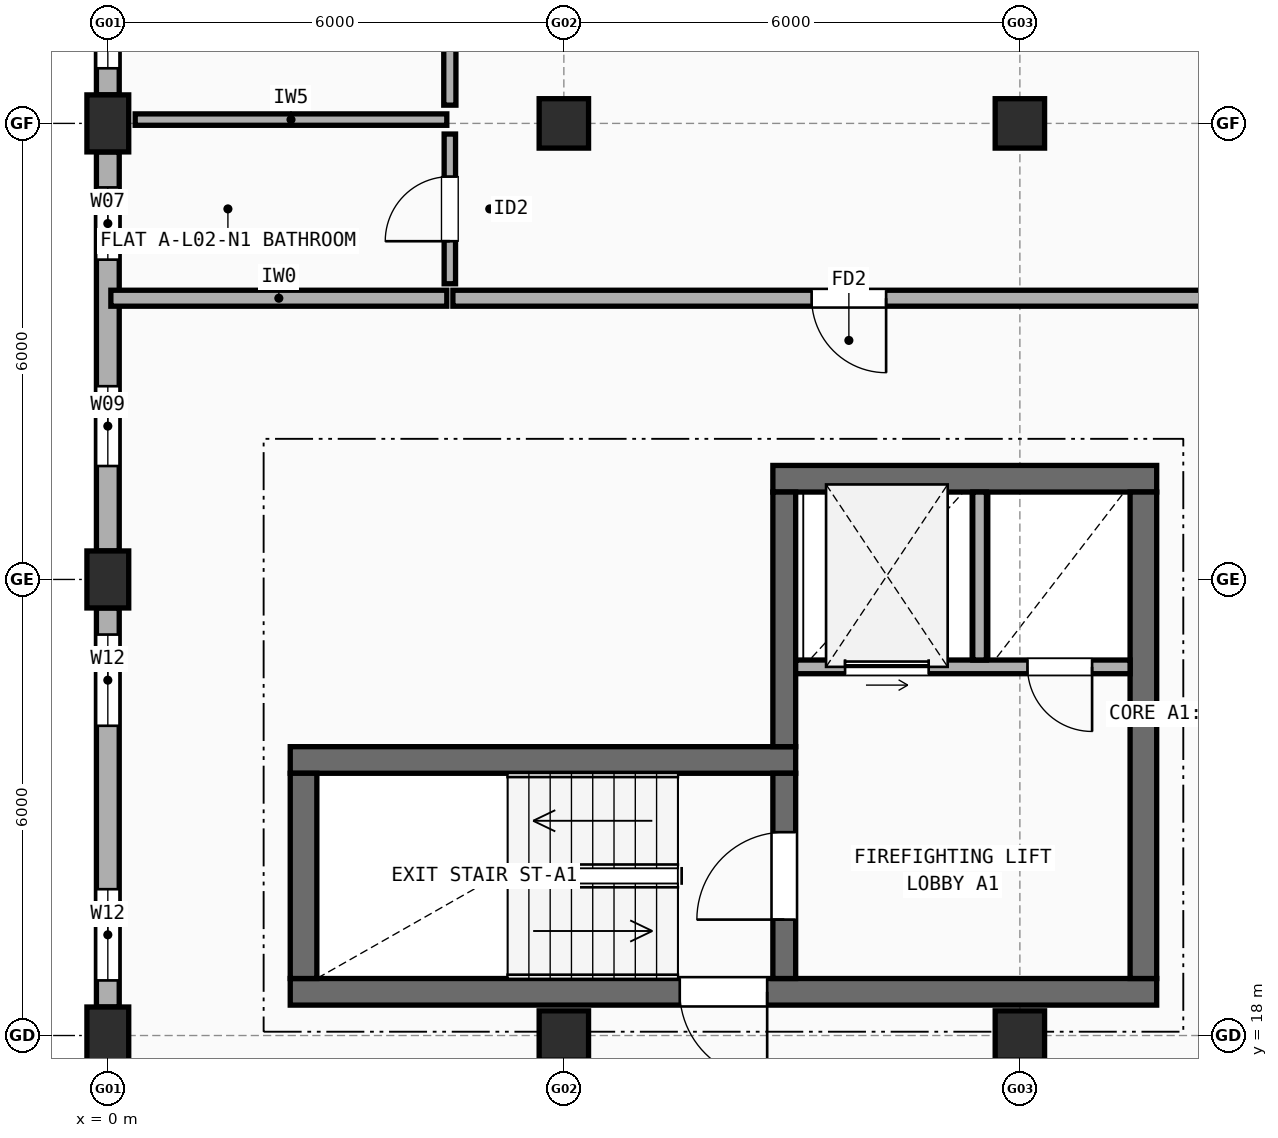
"""IFC4 building model, lengths in metres.
Left out: names, types, materials, properties, quantities, classifications, styles, units other than length and angle.
Written with IfcOpenShell. Run it as: python <this file> out.ifc"""

import sys

from ifc_helpers import new_model, si_unit, direction, frame, frame_2d, origin, origin_2d, place, context, subcontext, project, spatial, rectangle, extrude, element, fill, save


model = new_model("IFC4")
c1 = context("Model", 3, precision=1e-05, world=origin(), true_north=direction((0.0, 1.0)))
c2 = subcontext(c1, "Body", "Model", "MODEL_VIEW")
j1 = project(units=[si_unit("LENGTHUNIT", "METRE"), si_unit("PLANEANGLEUNIT", "RADIAN")], contexts=[c1])
p1 = place(None, origin())
s1 = spatial("IfcSite", under=j1, at=p1, CompositionType="ELEMENT")
p2 = place(p1, origin())
s2 = spatial("IfcBuilding", under=s1, at=p2, CompositionType="ELEMENT")
p3 = place(p2, frame((0.0, 0.0, 7.7)))
s3 = spatial("IfcBuildingStorey", under=s2, at=p3, CompositionType="ELEMENT", Elevation=7.7)
for number, where, z_axis, x_axis in (
    (1, (0.0, 18.0, 0.0), (0.0, 0.0, 1.0), (1.0, 0.0, 0.0)),
    (2, (0.0, 24.0, 0.0), (0.0, 0.0, 1.0), (1.0, 0.0, 0.0)),
    (3, (0.0, 30.0, 0.0), (0.0, 0.0, 1.0), (1.0, 0.0, 0.0)),
):
    element("IfcColumn", number, at=place(p3, frame(where, z_axis=z_axis, x_axis=x_axis)), inside=s3, PredefinedType="COLUMN", context=c2, shape_type="SweptSolid", body=[
        extrude(rectangle(XDim=0.55, YDim=0.75, at=origin_2d()), origin(), (0.0, 0.0, 1.0), 2.955),
    ])
for number, where, z_axis, x_axis in (
    (4, (6.0, 18.0, 0.0), (0.0, 0.0, 1.0), (1.0, 0.0, 0.0)),
    (5, (6.0, 30.0, 0.0), (0.0, 0.0, 1.0), (1.0, 0.0, 0.0)),
    (6, (12.0, 18.0, 0.0), (0.0, 0.0, 1.0), (1.0, 0.0, 0.0)),
    (7, (12.0, 30.0, 0.0), (0.0, 0.0, 1.0), (1.0, 0.0, 0.0)),
):
    element("IfcColumn", number, at=place(p3, frame(where, z_axis=z_axis, x_axis=x_axis)), inside=s3, PredefinedType="COLUMN", context=c2, shape_type="SweptSolid", body=[
        extrude(rectangle(XDim=0.65, YDim=0.65, at=origin_2d()), origin(), (0.0, 0.0, 1.0), 2.955),
    ])
p4 = place(p3, frame((0.0, 35.625, 0.0), z_axis=(0.0, 0.0, 1.0), x_axis=(0.0, -1.0, 0.0)))
e8 = element("IfcWall", 8, at=p4, inside=s3, PredefinedType="STANDARD", context=c2, shape_type="SweptSolid", body=[
    extrude(rectangle(XDim=5.25, YDim=0.3, at=frame_2d((2.625, 0.0))), origin(), (0.0, 0.0, 1.0), 2.437),
])
p5 = place(p4, frame((0.35, 0.0, 0.9)))
e9 = element("IfcOpeningElement", 9, at=p5, cuts=e8, PredefinedType="OPENING", context=c2, shape_type="SweptSolid", body=[
    extrude(rectangle(XDim=0.85, YDim=1.25, at=frame_2d((0.425, 0.625))), frame((0.0, 0.16, 0.0), z_axis=(0.0, -1.0, 0.0), x_axis=(1.0, 0.0, 0.0)), (0.0, 0.0, 1.0), 0.32),
])
p6 = place(p4, frame((4.05, 0.0, 0.9)))
e10 = element("IfcOpeningElement", 10, at=p6, cuts=e8, PredefinedType="OPENING", context=c2, shape_type="SweptSolid", body=[
    extrude(rectangle(XDim=0.85, YDim=1.25, at=frame_2d((0.425, 0.625))), frame((0.0, 0.16, 0.0), z_axis=(0.0, -1.0, 0.0), x_axis=(1.0, 0.0, 0.0)), (0.0, 0.0, 1.0), 0.32),
])
p7 = place(p3, frame((0.0, 29.625, 0.0), z_axis=(0.0, 0.0, 1.0), x_axis=(0.0, -1.0, 0.0)))
e11 = element("IfcWall", 11, at=p7, inside=s3, PredefinedType="STANDARD", context=c2, shape_type="SweptSolid", body=[
    extrude(rectangle(XDim=5.25, YDim=0.3, at=frame_2d((2.625, 0.0))), origin(), (0.0, 0.0, 1.0), 2.437),
])
p8 = place(p7, frame((0.468, 0.0, 0.9)))
e12 = element("IfcOpeningElement", 12, at=p8, cuts=e11, PredefinedType="OPENING", context=c2, shape_type="SweptSolid", body=[
    extrude(rectangle(XDim=0.95, YDim=1.35, at=frame_2d((0.475, 0.675))), frame((0.0, 0.16, 0.0), z_axis=(0.0, -1.0, 0.0), x_axis=(1.0, 0.0, 0.0)), (0.0, 0.0, 1.0), 0.32),
])
p9 = place(p7, frame((3.083, 0.0, 0.9)))
e13 = element("IfcOpeningElement", 13, at=p9, cuts=e11, PredefinedType="OPENING", context=c2, shape_type="SweptSolid", body=[
    extrude(rectangle(XDim=1.05, YDim=1.35, at=frame_2d((0.525, 0.675))), frame((0.0, 0.16, 0.0), z_axis=(0.0, -1.0, 0.0), x_axis=(1.0, 0.0, 0.0)), (0.0, 0.0, 1.0), 0.32),
])
p10 = place(p3, frame((0.0, 23.625, 0.0), z_axis=(0.0, 0.0, 1.0), x_axis=(0.0, -1.0, 0.0)))
e14 = element("IfcWall", 14, at=p10, inside=s3, PredefinedType="STANDARD", context=c2, shape_type="SweptSolid", body=[
    extrude(rectangle(XDim=5.25, YDim=0.3, at=frame_2d((2.625, 0.0))), origin(), (0.0, 0.0, 1.0), 2.437),
])
p11 = place(p10, frame((0.35, 0.0, 0.9)))
e15 = element("IfcOpeningElement", 15, at=p11, cuts=e14, PredefinedType="OPENING", context=c2, shape_type="SweptSolid", body=[
    extrude(rectangle(XDim=1.2, YDim=1.35, at=frame_2d((0.6, 0.675))), frame((0.0, 0.16, 0.0), z_axis=(0.0, -1.0, 0.0), x_axis=(1.0, 0.0, 0.0)), (0.0, 0.0, 1.0), 0.32),
])
p12 = place(p10, frame((3.7, 0.0, 0.9)))
e16 = element("IfcOpeningElement", 16, at=p12, cuts=e14, PredefinedType="OPENING", context=c2, shape_type="SweptSolid", body=[
    extrude(rectangle(XDim=1.2, YDim=1.35, at=frame_2d((0.6, 0.675))), frame((0.0, 0.16, 0.0), z_axis=(0.0, -1.0, 0.0), x_axis=(1.0, 0.0, 0.0)), (0.0, 0.0, 1.0), 0.32),
])
p13 = place(p3, frame((2.4, 18.575, 0.0), z_axis=(0.0, 0.0, 1.0), x_axis=(1.0, 0.0, 0.0)))
e17 = element("IfcWall", 17, at=p13, inside=s3, PredefinedType="SHEAR", context=c2, shape_type="SweptSolid", body=[
    extrude(rectangle(XDim=11.4, YDim=0.35, at=frame_2d((5.7, 0.0))), origin(), (0.0, 0.0, 1.0), 2.955),
])
p14 = place(p13, frame((5.125, 0.0, 0.0)))
e18 = element("IfcOpeningElement", 18, at=p14, cuts=e17, PredefinedType="OPENING", context=c2, shape_type="SweptSolid", body=[
    extrude(rectangle(XDim=1.15, YDim=2.15, at=frame_2d((0.575, 1.075))), frame((0.0, 0.185, 0.0), z_axis=(0.0, -1.0, 0.0), x_axis=(1.0, 0.0, 0.0)), (0.0, 0.0, 1.0), 0.37),
])
p15 = place(p3, frame((9.05, 21.625, 0.0), z_axis=(0.0, 0.0, 1.0), x_axis=(-1.0, 0.0, 0.0)))
e19 = element("IfcWall", 19, at=p15, inside=s3, PredefinedType="SHEAR", context=c2, shape_type="SweptSolid", body=[
    extrude(rectangle(XDim=6.65, YDim=0.35, at=frame_2d((3.325, 0.0))), origin(), (0.0, 0.0, 1.0), 2.955),
])
p16 = place(p3, frame((2.575, 21.45, 0.0), z_axis=(0.0, 0.0, 1.0), x_axis=(0.0, -1.0, 0.0)))
e20 = element("IfcWall", 20, at=p16, inside=s3, PredefinedType="SHEAR", context=c2, shape_type="SweptSolid", body=[
    extrude(rectangle(XDim=2.7, YDim=0.35, at=frame_2d((1.35, 0.0))), origin(), (0.0, 0.0, 1.0), 2.955),
])
p17 = place(p3, frame((8.9, 18.75, 0.0), z_axis=(0.0, 0.0, 1.0), x_axis=(0.0, 1.0, 0.0)))
e21 = element("IfcWall", 21, at=p17, inside=s3, PredefinedType="SHEAR", context=c2, shape_type="SweptSolid", body=[
    extrude(rectangle(XDim=2.7, YDim=0.3, at=frame_2d((1.35, 0.0))), origin(), (0.0, 0.0, 1.0), 2.955),
])
p18 = place(p17, frame((0.775, 0.0, 0.0)))
e22 = element("IfcOpeningElement", 22, at=p18, cuts=e21, PredefinedType="OPENING", context=c2, shape_type="SweptSolid", body=[
    extrude(rectangle(XDim=1.15, YDim=2.15, at=frame_2d((0.575, 1.075))), frame((0.0, 0.16, 0.0), z_axis=(0.0, -1.0, 0.0), x_axis=(1.0, 0.0, 0.0)), (0.0, 0.0, 1.0), 0.32),
])
p19 = place(p3, frame((13.8, 25.325, 0.0), z_axis=(0.0, 0.0, 1.0), x_axis=(-1.0, 0.0, 0.0)))
e23 = element("IfcWall", 23, at=p19, inside=s3, PredefinedType="SHEAR", context=c2, shape_type="SweptSolid", body=[
    extrude(rectangle(XDim=5.05, YDim=0.35, at=frame_2d((2.525, 0.0))), origin(), (0.0, 0.0, 1.0), 2.955),
])
p20 = place(p3, frame((13.625, 18.75, 0.0), z_axis=(0.0, 0.0, 1.0), x_axis=(0.0, 1.0, 0.0)))
e24 = element("IfcWall", 24, at=p20, inside=s3, PredefinedType="SHEAR", context=c2, shape_type="SweptSolid", body=[
    extrude(rectangle(XDim=6.4, YDim=0.35, at=frame_2d((3.2, 0.0))), origin(), (0.0, 0.0, 1.0), 2.955),
])
p21 = place(p3, frame((8.9, 21.8, 0.0), z_axis=(0.0, 0.0, 1.0), x_axis=(0.0, 1.0, 0.0)))
e25 = element("IfcWall", 25, at=p21, inside=s3, PredefinedType="SHEAR", context=c2, shape_type="SweptSolid", body=[
    extrude(rectangle(XDim=3.35, YDim=0.3, at=frame_2d((1.675, 0.0))), origin(), (0.0, 0.0, 1.0), 2.955),
])
p22 = place(p3, frame((9.05, 22.85, 0.0), z_axis=(0.0, 0.0, 1.0), x_axis=(1.0, 0.0, 0.0)))
e26 = element("IfcWall", 26, at=p22, inside=s3, PredefinedType="SOLIDWALL", context=c2, shape_type="SweptSolid", body=[
    extrude(rectangle(XDim=4.4, YDim=0.18, at=frame_2d((2.2, 0.0))), origin(), (0.0, 0.0, 1.0), 2.955),
])
p23 = place(p22, frame((0.65, 0.0, 0.0)))
e27 = element("IfcOpeningElement", 27, at=p23, cuts=e26, PredefinedType="OPENING", context=c2, shape_type="SweptSolid", body=[
    extrude(rectangle(XDim=1.1, YDim=2.15, at=frame_2d((0.55, 1.075))), frame((0.0, 0.1, 0.0), z_axis=(0.0, -1.0, 0.0), x_axis=(1.0, 0.0, 0.0)), (0.0, 0.0, 1.0), 0.2),
])
p24 = place(p22, frame((3.05, 0.0, 0.0)))
e28 = element("IfcOpeningElement", 28, at=p24, cuts=e26, PredefinedType="OPENING", context=c2, shape_type="SweptSolid", body=[
    extrude(rectangle(XDim=0.85, YDim=2.1, at=frame_2d((0.425, 1.05))), frame((0.0, 0.1, 0.0), z_axis=(0.0, -1.0, 0.0), x_axis=(1.0, 0.0, 0.0)), (0.0, 0.0, 1.0), 0.2),
])
p25 = place(p3, frame((11.47, 22.94, 0.0), z_axis=(0.0, 0.0, 1.0), x_axis=(0.0, 1.0, 0.0)))
e29 = element("IfcWall", 29, at=p25, inside=s3, PredefinedType="SOLIDWALL", context=c2, shape_type="SweptSolid", body=[
    extrude(rectangle(XDim=2.21, YDim=0.18, at=frame_2d((1.105, 0.0))), origin(), (0.0, 0.0, 1.0), 2.955),
])
p26 = place(p3, frame((0.04, 27.7, 0.0), z_axis=(0.0, 0.0, 1.0), x_axis=(1.0, 0.0, 0.0)))
e30 = element("IfcWall", 30, at=p26, inside=s3, PredefinedType="SOLIDWALL", context=c2, shape_type="SweptSolid", body=[
    extrude(rectangle(XDim=4.42, YDim=0.21, at=frame_2d((2.21, 0.0))), origin(), (0.0, 0.0, 1.0), 2.437),
])
p27 = place(p3, frame((4.54, 27.7, 0.0), z_axis=(0.0, 0.0, 1.0), x_axis=(1.0, 0.0, 0.0)))
e31 = element("IfcWall", 31, at=p27, inside=s3, PredefinedType="SOLIDWALL", context=c2, shape_type="SweptSolid", body=[
    extrude(rectangle(XDim=10.42, YDim=0.21, at=frame_2d((5.21, 0.0))), origin(), (0.0, 0.0, 1.0), 2.508),
])
p28 = place(p27, frame((4.72, 0.0, 0.0)))
e32 = element("IfcOpeningElement", 32, at=p28, cuts=e31, PredefinedType="OPENING", context=c2, shape_type="SweptSolid", body=[
    extrude(rectangle(XDim=0.98, YDim=2.15, at=frame_2d((0.49, 1.075))), frame((0.0, 0.115, 0.0), z_axis=(0.0, -1.0, 0.0), x_axis=(1.0, 0.0, 0.0)), (0.0, 0.0, 1.0), 0.23),
])
p29 = place(p3, frame((4.5, 30.24, 0.0), z_axis=(0.0, 0.0, 1.0), x_axis=(0.0, 1.0, 0.0)))
e33 = element("IfcWall", 33, at=p29, inside=s3, PredefinedType="PLUMBINGWALL", context=c2, shape_type="SweptSolid", body=[
    extrude(rectangle(XDim=7.37, YDim=0.16, at=frame_2d((3.685, 0.0))), origin(), (0.0, 0.0, 1.0), 2.437),
])
p30 = place(p29, frame((3.235, 0.0, 0.0)))
e34 = element("IfcOpeningElement", 34, at=p30, cuts=e33, PredefinedType="OPENING", context=c2, shape_type="SweptSolid", body=[
    extrude(rectangle(XDim=0.9, YDim=2.1, at=frame_2d((0.45, 1.05))), frame((0.0, 0.09, 0.0), z_axis=(0.0, -1.0, 0.0), x_axis=(1.0, 0.0, 0.0)), (0.0, 0.0, 1.0), 0.18),
])
p31 = place(p3, frame((4.5, 27.89, 0.0), z_axis=(0.0, 0.0, 1.0), x_axis=(0.0, 1.0, 0.0)))
e35 = element("IfcWall", 35, at=p31, inside=s3, PredefinedType="PARTITIONING", context=c2, shape_type="SweptSolid", body=[
    extrude(rectangle(XDim=1.97, YDim=0.15, at=frame_2d((0.985, 0.0))), origin(), (0.0, 0.0, 1.0), 2.955),
])
p32 = place(p31, frame((0.56, 0.0, 0.0)))
e36 = element("IfcOpeningElement", 36, at=p32, cuts=e35, PredefinedType="OPENING", context=c2, shape_type="SweptSolid", body=[
    extrude(rectangle(XDim=0.85, YDim=2.1, at=frame_2d((0.425, 1.05))), frame((0.0, 0.085, 0.0), z_axis=(0.0, -1.0, 0.0), x_axis=(1.0, 0.0, 0.0)), (0.0, 0.0, 1.0), 0.17),
])
p33 = place(p3, frame((0.36, 30.05, 0.0), z_axis=(0.0, 0.0, 1.0), x_axis=(1.0, 0.0, 0.0)))
e37 = element("IfcWall", 37, at=p33, inside=s3, PredefinedType="PARTITIONING", context=c2, shape_type="SweptSolid", body=[
    extrude(rectangle(XDim=4.1, YDim=0.15, at=frame_2d((2.05, 0.0))), origin(), (0.0, 0.0, 1.0), 2.437),
])
p34 = place(p6, origin())
e38 = element("IfcWindow", 38, at=p34, inside=s3, PartitioningType="SINGLE_PANEL", PredefinedType="WINDOW", context=c2, shape_type="SweptSolid", body=[
    extrude(rectangle(XDim=0.85, YDim=1.25, at=frame_2d((0.425, 0.625))), frame((0.0, 0.03, 0.0), z_axis=(0.0, -1.0, 0.0), x_axis=(1.0, 0.0, 0.0)), (0.0, 0.0, 1.0), 0.06),
])
fill(e10, e38)
p35 = place(p8, origin())
e39 = element("IfcWindow", 39, at=p35, inside=s3, PartitioningType="SINGLE_PANEL", PredefinedType="WINDOW", context=c2, shape_type="SweptSolid", body=[
    extrude(rectangle(XDim=0.95, YDim=1.35, at=frame_2d((0.475, 0.675))), frame((0.0, 0.03, 0.0), z_axis=(0.0, -1.0, 0.0), x_axis=(1.0, 0.0, 0.0)), (0.0, 0.0, 1.0), 0.06),
])
fill(e12, e39)
p36 = place(p9, origin())
e40 = element("IfcWindow", 40, at=p36, inside=s3, PartitioningType="SINGLE_PANEL", PredefinedType="WINDOW", context=c2, shape_type="SweptSolid", body=[
    extrude(rectangle(XDim=1.05, YDim=1.35, at=frame_2d((0.525, 0.675))), frame((0.0, 0.03, 0.0), z_axis=(0.0, -1.0, 0.0), x_axis=(1.0, 0.0, 0.0)), (0.0, 0.0, 1.0), 0.06),
])
fill(e13, e40)
p37 = place(p11, origin())
e41 = element("IfcWindow", 41, at=p37, inside=s3, PartitioningType="SINGLE_PANEL", PredefinedType="WINDOW", context=c2, shape_type="SweptSolid", body=[
    extrude(rectangle(XDim=1.2, YDim=1.35, at=frame_2d((0.6, 0.675))), frame((0.0, 0.03, 0.0), z_axis=(0.0, -1.0, 0.0), x_axis=(1.0, 0.0, 0.0)), (0.0, 0.0, 1.0), 0.06),
])
fill(e15, e41)
p38 = place(p12, origin())
e42 = element("IfcWindow", 42, at=p38, inside=s3, PartitioningType="SINGLE_PANEL", PredefinedType="WINDOW", context=c2, shape_type="SweptSolid", body=[
    extrude(rectangle(XDim=1.2, YDim=1.35, at=frame_2d((0.6, 0.675))), frame((0.0, 0.03, 0.0), z_axis=(0.0, -1.0, 0.0), x_axis=(1.0, 0.0, 0.0)), (0.0, 0.0, 1.0), 0.06),
])
fill(e16, e42)
p39 = place(p14, origin())
e43 = element("IfcDoor", 43, at=p39, inside=s3, OperationType="SINGLE_SWING_RIGHT", PredefinedType="DOOR", context=c2, shape_type="SweptSolid", body=[
    extrude(rectangle(XDim=1.15, YDim=2.15, at=frame_2d((0.575, 1.075))), frame((0.0, 0.025, 0.0), z_axis=(0.0, -1.0, 0.0), x_axis=(1.0, 0.0, 0.0)), (0.0, 0.0, 1.0), 0.05),
])
fill(e18, e43)
p40 = place(p18, origin())
e44 = element("IfcDoor", 44, at=p40, inside=s3, OperationType="SINGLE_SWING_LEFT", PredefinedType="DOOR", context=c2, shape_type="SweptSolid", body=[
    extrude(rectangle(XDim=1.15, YDim=2.15, at=frame_2d((0.575, 1.075))), frame((0.0, 0.025, 0.0), z_axis=(0.0, -1.0, 0.0), x_axis=(1.0, 0.0, 0.0)), (0.0, 0.0, 1.0), 0.05),
])
fill(e22, e44)
p41 = place(p23, origin())
e45 = element("IfcDoor", 45, at=p41, inside=s3, OperationType="SLIDING_TO_LEFT", PredefinedType="DOOR", context=c2, shape_type="SweptSolid", body=[
    extrude(rectangle(XDim=1.1, YDim=2.15, at=frame_2d((0.55, 1.075))), frame((0.0, 0.025, 0.0), z_axis=(0.0, -1.0, 0.0), x_axis=(1.0, 0.0, 0.0)), (0.0, 0.0, 1.0), 0.05),
])
fill(e27, e45)
p42 = place(p24, frame((0.85, 0.0, 0.0), z_axis=(0.0, 0.0, 1.0), x_axis=(-1.0, 0.0, 0.0)))
e46 = element("IfcDoor", 46, at=p42, inside=s3, OperationType="SINGLE_SWING_RIGHT", PredefinedType="DOOR", context=c2, shape_type="SweptSolid", body=[
    extrude(rectangle(XDim=0.85, YDim=2.1, at=frame_2d((0.425, 1.05))), frame((0.0, 0.025, 0.0), z_axis=(0.0, -1.0, 0.0), x_axis=(1.0, 0.0, 0.0)), (0.0, 0.0, 1.0), 0.05),
])
fill(e28, e46)
p43 = place(p28, origin())
e47 = element("IfcDoor", 47, at=p43, inside=s3, OperationType="SINGLE_SWING_RIGHT", PredefinedType="DOOR", context=c2, shape_type="SweptSolid", body=[
    extrude(rectangle(XDim=0.98, YDim=2.15, at=frame_2d((0.49, 1.075))), frame((0.0, 0.025, 0.0), z_axis=(0.0, -1.0, 0.0), x_axis=(1.0, 0.0, 0.0)), (0.0, 0.0, 1.0), 0.05),
])
fill(e32, e47)
p44 = place(p32, origin())
e48 = element("IfcDoor", 48, at=p44, inside=s3, OperationType="SINGLE_SWING_LEFT", PredefinedType="DOOR", context=c2, shape_type="SweptSolid", body=[
    extrude(rectangle(XDim=0.85, YDim=2.1, at=frame_2d((0.425, 1.05))), frame((0.0, 0.025, 0.0), z_axis=(0.0, -1.0, 0.0), x_axis=(1.0, 0.0, 0.0)), (0.0, 0.0, 1.0), 0.05),
])
fill(e36, e48)
save(model, sys.argv[1])
